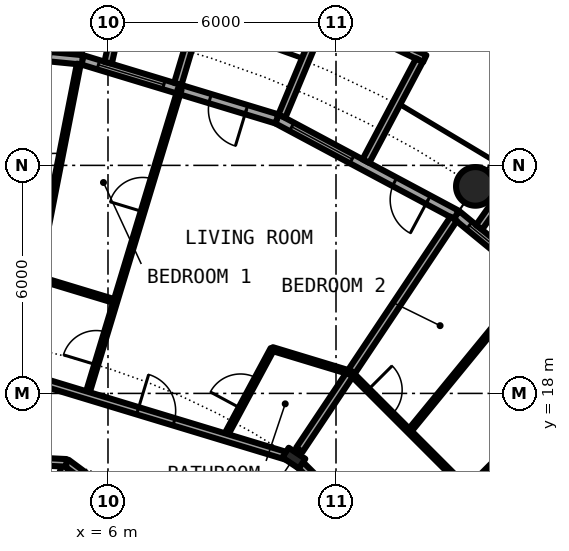
"""IFC4 building model, lengths in metres.
Left out: names, types, materials, properties, quantities, classifications, styles, units other than length and angle.
Written with IfcOpenShell. Run it as: python <this file> out.ifc"""

import sys

from ifc_helpers import new_model, si_unit, direction, frame, frame_2d, origin, origin_2d, place, context, subcontext, project, spatial, rectangle, circle, hollow_circle, i_section, extrude, element, fill, save


model = new_model("IFC4")
c1 = context("Model", 3, precision=1e-05, world=origin(), true_north=direction((0.0, 1.0)))
c2 = subcontext(c1, "Body", "Model", "MODEL_VIEW")
j1 = project(units=[si_unit("LENGTHUNIT", "METRE"), si_unit("PLANEANGLEUNIT", "RADIAN")], contexts=[c1])
p1 = place(None, origin())
s1 = spatial("IfcSite", under=j1, at=p1, CompositionType="ELEMENT")
p2 = place(p1, origin())
s2 = spatial("IfcBuilding", under=s1, at=p2, CompositionType="ELEMENT")
p3 = place(p2, frame((0.0, 0.0, 88.0)))
s3 = spatial("IfcBuildingStorey", under=s2, at=p3, CompositionType="ELEMENT", Elevation=88.0)
p4 = place(p3, frame((15.667, 23.448, 0.0), z_axis=(0.0, 0.0, 1.0), x_axis=(1.0, 0.0, 0.0)))
e1 = element("IfcColumn", 1, at=p4, inside=s3, PredefinedType="COLUMN", context=c2, shape_type="SweptSolid", body=[
    extrude(hollow_circle(Radius=0.508, WallThickness=0.04, at=origin_2d()), origin(), (0.0, 0.0, 1.0), 3.05),
])
p5 = place(p3, frame((10.889, 16.297, 0.0), z_axis=(0.0, 0.0, 1.0), x_axis=(0.55557023302, 0.831469612303, 0.0)))
e2 = element("IfcColumn", 2, at=p5, inside=s3, PredefinedType="COLUMN", context=c2, shape_type="SweptSolid", body=[
    extrude(i_section(OverallWidth=0.306, OverallDepth=0.524, WebThickness=0.021, FlangeThickness=0.04, FilletRadius=0.027, at=origin_2d()), origin(), (0.0, 0.0, 1.0), 3.05),
])
p6 = place(p3, frame((19.304, 19.304, 0.0), z_axis=(0.0, 0.0, 1.0), x_axis=(-0.773019449054, 0.634382322723, 0.0)))
e3 = element("IfcWall", 3, at=p6, inside=s3, PredefinedType="SOLIDWALL", context=c2, shape_type="SweptSolid", body=[
    extrude(rectangle(XDim=5.352, YDim=0.25, at=frame_2d((2.676, 0.0))), origin(), (0.0, 0.0, 1.0), 2.7),
])
p7 = place(p6, frame((0.841, 0.0, 0.0)))
e4 = element("IfcOpeningElement", 4, at=p7, cuts=e3, PredefinedType="OPENING", context=c2, shape_type="SweptSolid", body=[
    extrude(rectangle(XDim=1.0, YDim=2.2, at=frame_2d((0.5, 1.1))), frame((0.0, 0.135, 0.0), z_axis=(0.0, -1.0, 0.0), x_axis=(1.0, 0.0, 0.0)), (0.0, 0.0, 1.0), 0.27),
])
p8 = place(p6, frame((3.111, 0.0, 0.3)))
e5 = element("IfcOpeningElement", 5, at=p8, cuts=e3, PredefinedType="OPENING", context=c2, shape_type="SweptSolid", body=[
    extrude(rectangle(XDim=1.8, YDim=2.1, at=frame_2d((0.9, 1.05))), frame((0.0, 0.135, 0.0), z_axis=(0.0, -1.0, 0.0), x_axis=(1.0, 0.0, 0.0)), (0.0, 0.0, 1.0), 0.27),
])
p9 = place(p3, frame((15.765, 22.37, -0.03), z_axis=(0.0, 0.0, 1.0), x_axis=(0.576274612209, 0.817256123454, 0.0)))
e6 = element("IfcWall", 6, at=p9, inside=s3, PredefinedType="SOLIDWALL", context=c2, shape_type="SweptSolid", body=[
    extrude(rectangle(XDim=2.933, YDim=0.2, at=frame_2d((1.466, 0.0))), origin(), (0.0, 0.0, 1.0), 2.73),
])
p10 = place(p3, frame((15.167, 22.699, 0.0), z_axis=(0.0, 0.0, 1.0), x_axis=(-0.881915646801, 0.471407246368, 0.0)))
e7 = element("IfcWall", 7, at=p10, inside=s3, PredefinedType="SOLIDWALL", context=c2, shape_type="SweptSolid", body=[
    extrude(rectangle(XDim=5.352, YDim=0.25, at=frame_2d((2.676, 0.0))), origin(), (0.0, 0.0, 1.0), 2.7),
])
p11 = place(p10, frame((0.841, 0.0, 0.0)))
e8 = element("IfcOpeningElement", 8, at=p11, cuts=e7, PredefinedType="OPENING", context=c2, shape_type="SweptSolid", body=[
    extrude(rectangle(XDim=1.0, YDim=2.2, at=frame_2d((0.5, 1.1))), frame((0.0, 0.135, 0.0), z_axis=(0.0, -1.0, 0.0), x_axis=(1.0, 0.0, 0.0)), (0.0, 0.0, 1.0), 0.27),
])
p12 = place(p10, frame((3.111, 0.0, 0.3)))
e9 = element("IfcOpeningElement", 9, at=p12, cuts=e7, PredefinedType="OPENING", context=c2, shape_type="SweptSolid", body=[
    extrude(rectangle(XDim=1.8, YDim=2.1, at=frame_2d((0.9, 1.05))), frame((0.0, 0.135, 0.0), z_axis=(0.0, -1.0, 0.0), x_axis=(1.0, 0.0, 0.0)), (0.0, 0.0, 1.0), 0.27),
])
p13 = place(p3, frame((14.335, 26.808, -0.03), z_axis=(0.0, 0.0, 1.0), x_axis=(-0.904000060331, 0.427532327342, 0.0)))
e10 = element("IfcWall", 10, at=p13, inside=s3, PredefinedType="SOLIDWALL", context=c2, shape_type="SweptSolid", body=[
    extrude(rectangle(XDim=2.993, YDim=0.2, at=frame_2d((1.497, 0.0))), origin(), (0.0, 0.0, 1.0), 2.73),
])
p14 = place(p13, frame((0.457, 0.0, 0.33)))
e11 = element("IfcOpeningElement", 11, at=p14, cuts=e10, PredefinedType="OPENING", context=c2, shape_type="SweptSolid", body=[
    extrude(circle(Radius=1.04, at=frame_2d((1.04, 1.04))), frame((0.0, 0.11, 0.0), z_axis=(0.0, -1.0, 0.0), x_axis=(1.0, 0.0, 0.0)), (0.0, 0.0, 1.0), 0.22),
])
p15 = place(p3, frame((12.787, 24.113, -0.03), z_axis=(0.0, 0.0, 1.0), x_axis=(0.468365282436, 0.883534924159, 0.0)))
e12 = element("IfcWall", 12, at=p15, inside=s3, PredefinedType="SOLIDWALL", context=c2, shape_type="SweptSolid", body=[
    extrude(rectangle(XDim=3.006, YDim=0.2, at=frame_2d((1.503, 0.0))), origin(), (0.0, 0.0, 1.0), 2.73),
])
p16 = place(p3, frame((10.575, 25.295, -0.03), z_axis=(0.0, 0.0, 1.0), x_axis=(0.385697364644, 0.922625353492, 0.0)))
e13 = element("IfcWall", 13, at=p16, inside=s3, PredefinedType="SOLIDWALL", context=c2, shape_type="SweptSolid", body=[
    extrude(rectangle(XDim=2.883, YDim=0.2, at=frame_2d((1.442, 0.0))), origin(), (0.0, 0.0, 1.0), 2.73),
])
p17 = place(p3, frame((10.447, 25.222, 0.0), z_axis=(0.0, 0.0, 1.0), x_axis=(-0.956965678721, 0.290201119486, 0.0)))
e14 = element("IfcWall", 14, at=p17, inside=s3, PredefinedType="SOLIDWALL", context=c2, shape_type="SweptSolid", body=[
    extrude(rectangle(XDim=5.351, YDim=0.25, at=frame_2d((2.676, 0.0))), origin(), (0.0, 0.0, 1.0), 2.7),
])
p18 = place(p17, frame((0.841, 0.0, 0.0)))
e15 = element("IfcOpeningElement", 15, at=p18, cuts=e14, PredefinedType="OPENING", context=c2, shape_type="SweptSolid", body=[
    extrude(rectangle(XDim=1.0, YDim=2.2, at=frame_2d((0.5, 1.1))), frame((0.0, 0.135, 0.0), z_axis=(0.0, -1.0, 0.0), x_axis=(1.0, 0.0, 0.0)), (0.0, 0.0, 1.0), 0.27),
])
p19 = place(p17, frame((3.111, 0.0, 0.3)))
e16 = element("IfcOpeningElement", 16, at=p19, cuts=e14, PredefinedType="OPENING", context=c2, shape_type="SweptSolid", body=[
    extrude(rectangle(XDim=1.8, YDim=2.1, at=frame_2d((0.9, 1.05))), frame((0.0, 0.135, 0.0), z_axis=(0.0, -1.0, 0.0), x_axis=(1.0, 0.0, 0.0)), (0.0, 0.0, 1.0), 0.27),
])
p20 = place(p3, frame((7.837, 26.144, -0.03), z_axis=(0.0, 0.0, 1.0), x_axis=(0.287064767992, 0.957911174889, 0.0)))
e17 = element("IfcWall", 17, at=p20, inside=s3, PredefinedType="SOLIDWALL", context=c2, shape_type="SweptSolid", body=[
    extrude(rectangle(XDim=3.006, YDim=0.2, at=frame_2d((1.503, 0.0))), origin(), (0.0, 0.0, 1.0), 2.73),
])
p21 = place(p3, frame((6.004, 26.7, -0.03), z_axis=(0.0, 0.0, 1.0), x_axis=(0.219609259383, 0.975587911566, 0.0)))
e18 = element("IfcWall", 18, at=p21, inside=s3, PredefinedType="SOLIDWALL", context=c2, shape_type="SweptSolid", body=[
    extrude(rectangle(XDim=2.933, YDim=0.2, at=frame_2d((1.466, 0.0))), origin(), (0.0, 0.0, 1.0), 2.73),
])
p22 = place(p3, frame((5.326, 26.775, 0.0), z_axis=(0.0, 0.0, 1.0), x_axis=(-0.995173996315, 0.098126026407, 0.0)))
e19 = element("IfcWall", 19, at=p22, inside=s3, PredefinedType="SOLIDWALL", context=c2, shape_type="SweptSolid", body=[
    extrude(rectangle(XDim=5.352, YDim=0.25, at=frame_2d((2.676, 0.0))), origin(), (0.0, 0.0, 1.0), 2.7),
])
p23 = place(p22, frame((0.841, 0.0, 0.0)))
e20 = element("IfcOpeningElement", 20, at=p23, cuts=e19, PredefinedType="OPENING", context=c2, shape_type="SweptSolid", body=[
    extrude(rectangle(XDim=1.0, YDim=2.2, at=frame_2d((0.5, 1.1))), frame((0.0, 0.135, 0.0), z_axis=(0.0, -1.0, 0.0), x_axis=(1.0, 0.0, 0.0)), (0.0, 0.0, 1.0), 0.27),
])
p24 = place(p22, frame((3.111, 0.0, 0.3)))
e21 = element("IfcOpeningElement", 21, at=p24, cuts=e19, PredefinedType="OPENING", context=c2, shape_type="SweptSolid", body=[
    extrude(rectangle(XDim=1.8, YDim=2.1, at=frame_2d((0.9, 1.05))), frame((0.0, 0.135, 0.0), z_axis=(0.0, -1.0, 0.0), x_axis=(1.0, 0.0, 0.0)), (0.0, 0.0, 1.0), 0.27),
])
p25 = place(p3, frame((2.243, 7.387, 0.0), z_axis=(0.0, 0.0, 1.0), x_axis=(0.290196345171, 0.956967126525, 0.0)))
e22 = element("IfcWall", 22, at=p25, inside=s3, PredefinedType="PARTITIONING", context=c2, shape_type="SweptSolid", body=[
    extrude(rectangle(XDim=9.18, YDim=0.2, at=frame_2d((4.59, 0.0))), origin(), (0.0, 0.0, 1.0), 2.7),
])
p26 = place(p3, frame((4.13, 21.047, 0.0), z_axis=(0.0, 0.0, 1.0), x_axis=(0.192433779325, 0.981309961518, 0.0)))
e23 = element("IfcWall", 23, at=p26, inside=s3, PredefinedType="PARTITIONING", context=c2, shape_type="SweptSolid", body=[
    extrude(rectangle(XDim=5.727, YDim=0.1, at=frame_2d((2.863, 0.0))), origin(), (0.0, 0.0, 1.0), 2.7),
])
p27 = place(p26, frame((2.414, 0.0, 0.0)))
e24 = element("IfcOpeningElement", 24, at=p27, cuts=e23, PredefinedType="OPENING", context=c2, shape_type="SweptSolid", body=[
    extrude(rectangle(XDim=0.9, YDim=2.3, at=frame_2d((0.45, 1.15))), frame((0.0, 0.06, 0.0), z_axis=(0.0, -1.0, 0.0), x_axis=(1.0, 0.0, 0.0)), (0.0, 0.0, 1.0), 0.12),
])
p28 = place(p3, frame((5.445, 17.948, 0.0), z_axis=(0.0, 0.0, 1.0), x_axis=(0.290158700753, 0.956978541231, 0.0)))
e25 = element("IfcWall", 25, at=p28, inside=s3, PredefinedType="PARTITIONING", context=c2, shape_type="SweptSolid", body=[
    extrude(rectangle(XDim=8.419, YDim=0.1, at=frame_2d((4.209, 0.0))), origin(), (0.0, 0.0, 1.0), 2.7),
])
p29 = place(p28, frame((0.842, 0.0, 0.0)))
e26 = element("IfcOpeningElement", 26, at=p29, cuts=e25, PredefinedType="OPENING", context=c2, shape_type="SweptSolid", body=[
    extrude(rectangle(XDim=0.9, YDim=2.3, at=frame_2d((0.45, 1.15))), frame((0.0, 0.06, 0.0), z_axis=(0.0, -1.0, 0.0), x_axis=(1.0, 0.0, 0.0)), (0.0, 0.0, 1.0), 0.12),
])
p30 = place(p28, frame((5.052, 0.0, 0.0)))
e27 = element("IfcOpeningElement", 27, at=p30, cuts=e25, PredefinedType="OPENING", context=c2, shape_type="SweptSolid", body=[
    extrude(rectangle(XDim=0.9, YDim=2.3, at=frame_2d((0.45, 1.15))), frame((0.0, 0.06, 0.0), z_axis=(0.0, -1.0, 0.0), x_axis=(1.0, 0.0, 0.0)), (0.0, 0.0, 1.0), 0.12),
])
p31 = place(p3, frame((9.074, 16.847, 0.0), z_axis=(0.0, 0.0, 1.0), x_axis=(0.474160570331, 0.880438387136, 0.0)))
e28 = element("IfcWall", 28, at=p31, inside=s3, PredefinedType="PARTITIONING", context=c2, shape_type="SweptSolid", body=[
    extrude(rectangle(XDim=2.636, YDim=0.1, at=frame_2d((1.318, 0.0))), origin(), (0.0, 0.0, 1.0), 2.7),
])
p32 = place(p31, frame((0.868, 0.0, 0.0)))
e29 = element("IfcOpeningElement", 29, at=p32, cuts=e28, PredefinedType="OPENING", context=c2, shape_type="SweptSolid", body=[
    extrude(rectangle(XDim=0.9, YDim=2.3, at=frame_2d((0.45, 1.15))), frame((0.0, 0.06, 0.0), z_axis=(0.0, -1.0, 0.0), x_axis=(1.0, 0.0, 0.0)), (0.0, 0.0, 1.0), 0.12),
])
p33 = place(p3, frame((11.035, 16.515, 0.0), z_axis=(0.0, 0.0, 1.0), x_axis=(0.555516661303, 0.831505405283, 0.0)))
e30 = element("IfcWall", 30, at=p33, inside=s3, PredefinedType="PARTITIONING", context=c2, shape_type="SweptSolid", body=[
    extrude(rectangle(XDim=7.312, YDim=0.2, at=frame_2d((3.656, 0.0))), origin(), (0.0, 0.0, 1.0), 2.7),
])
p34 = place(p3, frame((13.927, 17.004, 0.0), z_axis=(0.0, 0.0, 1.0), x_axis=(0.633774976367, 0.773517471898, 0.0)))
e31 = element("IfcWall", 31, at=p34, inside=s3, PredefinedType="PARTITIONING", context=c2, shape_type="SweptSolid", body=[
    extrude(rectangle(XDim=5.196, YDim=0.1, at=frame_2d((2.598, 0.0))), origin(), (0.0, 0.0, 1.0), 2.7),
])
p35 = place(p3, frame((15.465, 15.465, 0.0), z_axis=(0.0, 0.0, 1.0), x_axis=(0.707106781187, 0.707106781187, 0.0)))
e32 = element("IfcWall", 32, at=p35, inside=s3, PredefinedType="PARTITIONING", context=c2, shape_type="SweptSolid", body=[
    extrude(rectangle(XDim=5.305, YDim=0.1, at=frame_2d((2.652, 0.0))), origin(), (0.0, 0.0, 1.0), 2.7),
])
p36 = place(p35, frame((2.202, 0.0, 0.0)))
e33 = element("IfcOpeningElement", 33, at=p36, cuts=e32, PredefinedType="OPENING", context=c2, shape_type="SweptSolid", body=[
    extrude(rectangle(XDim=0.9, YDim=2.3, at=frame_2d((0.45, 1.15))), frame((0.0, 0.06, 0.0), z_axis=(0.0, -1.0, 0.0), x_axis=(1.0, 0.0, 0.0)), (0.0, 0.0, 1.0), 0.12),
])
p37 = place(p3, frame((4.906, 16.172, 0.0), z_axis=(0.0, 0.0, 1.0), x_axis=(0.803191461888, -0.595720971219, 0.0)))
e34 = element("IfcWall", 34, at=p37, inside=s3, PredefinedType="PARTITIONING", context=c2, shape_type="SweptSolid", body=[
    extrude(rectangle(XDim=9.76, YDim=0.2, at=frame_2d((4.88, 0.0))), origin(), (0.0, 0.0, 1.0), 2.7),
])
p38 = place(p37, frame((4.38, 0.0, 0.0)))
e35 = element("IfcOpeningElement", 35, at=p38, cuts=e34, PredefinedType="OPENING", context=c2, shape_type="SweptSolid", body=[
    extrude(rectangle(XDim=1.0, YDim=2.3, at=frame_2d((0.5, 1.15))), frame((0.0, 0.11, 0.0), z_axis=(0.0, -1.0, 0.0), x_axis=(1.0, 0.0, 0.0)), (0.0, 0.0, 1.0), 0.22),
])
p39 = place(p3, frame((-3.298, 16.574, 0.0), z_axis=(0.0, 0.0, 1.0), x_axis=(0.998802523271, -0.048923608895, 0.0)))
e36 = element("IfcWall", 36, at=p39, inside=s3, PredefinedType="PARTITIONING", context=c2, shape_type="SweptSolid", body=[
    extrude(rectangle(XDim=8.214, YDim=0.2, at=frame_2d((4.107, 0.0))), origin(), (0.0, 0.0, 1.0), 2.7),
])
p40 = place(p39, frame((3.6, 0.0, 0.0)))
e37 = element("IfcOpeningElement", 37, at=p40, cuts=e36, PredefinedType="OPENING", context=c2, shape_type="SweptSolid", body=[
    extrude(rectangle(XDim=1.0, YDim=2.3, at=frame_2d((0.5, 1.15))), frame((0.0, 0.11, 0.0), z_axis=(0.0, -1.0, 0.0), x_axis=(1.0, 0.0, 0.0)), (0.0, 0.0, 1.0), 0.22),
])
p41 = place(p3, frame((-0.007, 19.599, 0.0), z_axis=(0.0, 0.0, 1.0), x_axis=(0.95700958731, -0.290056287291, 0.0)))
e38 = element("IfcWall", 38, at=p41, inside=s3, PredefinedType="PARTITIONING", context=c2, shape_type="SweptSolid", body=[
    extrude(rectangle(XDim=11.226, YDim=0.2, at=frame_2d((5.613, 0.0))), origin(), (0.0, 0.0, 1.0), 2.38),
])
p42 = place(p41, frame((7.093, 0.0, 0.0)))
e39 = element("IfcOpeningElement", 39, at=p42, cuts=e38, PredefinedType="OPENING", context=c2, shape_type="SweptSolid", body=[
    extrude(rectangle(XDim=1.0, YDim=2.3, at=frame_2d((0.5, 1.15))), frame((0.0, 0.11, 0.0), z_axis=(0.0, -1.0, 0.0), x_axis=(1.0, 0.0, 0.0)), (0.0, 0.0, 1.0), 0.22),
])
p43 = place(p3, frame((11.0, 16.186, 0.0), z_axis=(0.0, 0.0, 1.0), x_axis=(0.707106781187, -0.707106781187, 0.0)))
e40 = element("IfcWall", 40, at=p43, inside=s3, PredefinedType="PARTITIONING", context=c2, shape_type="SweptSolid", body=[
    extrude(rectangle(XDim=7.334, YDim=0.2, at=frame_2d((3.667, 0.0))), origin(), (0.0, 0.0, 1.0), 2.38),
])
p44 = place(p43, frame((2.211, 0.0, 0.0)))
e41 = element("IfcOpeningElement", 41, at=p44, cuts=e40, PredefinedType="OPENING", context=c2, shape_type="SweptSolid", body=[
    extrude(rectangle(XDim=1.0, YDim=2.3, at=frame_2d((0.5, 1.15))), frame((0.0, 0.11, 0.0), z_axis=(0.0, -1.0, 0.0), x_axis=(1.0, 0.0, 0.0)), (0.0, 0.0, 1.0), 0.22),
])
p45 = place(p3, frame((-0.004, 22.299, 0.0), z_axis=(0.0, 0.0, 1.0), x_axis=(0.95699555343, -0.290102586537, 0.0)))
e42 = element("IfcWall", 42, at=p45, inside=s3, PredefinedType="PARTITIONING", context=c2, shape_type="SweptSolid", body=[
    extrude(rectangle(XDim=6.478, YDim=0.1, at=frame_2d((3.239, 0.0))), origin(), (0.0, 0.0, 1.0), 2.7),
])
p46 = place(p3, frame((10.324, 19.168, 0.0), z_axis=(0.0, 0.0, 1.0), x_axis=(0.956993947591, -0.290107883852, 0.0)))
e43 = element("IfcWall", 43, at=p46, inside=s3, PredefinedType="PARTITIONING", context=c2, shape_type="SweptSolid", body=[
    extrude(rectangle(XDim=2.158, YDim=0.1, at=frame_2d((1.079, 0.0))), origin(), (0.0, 0.0, 1.0), 2.7),
])
p47 = place(p3, frame((12.389, 18.542, 0.0), z_axis=(0.0, 0.0, 1.0), x_axis=(0.707022606819, -0.707190945535, 0.0)))
e44 = element("IfcWall", 44, at=p47, inside=s3, PredefinedType="PARTITIONING", context=c2, shape_type="SweptSolid", body=[
    extrude(rectangle(XDim=4.351, YDim=0.1, at=frame_2d((2.175, 0.0))), origin(), (0.0, 0.0, 1.0), 2.7),
])
p48 = place(p47, frame((0.639, 0.0, 0.0)))
e45 = element("IfcOpeningElement", 45, at=p48, cuts=e44, PredefinedType="OPENING", context=c2, shape_type="SweptSolid", body=[
    extrude(rectangle(XDim=0.9, YDim=2.3, at=frame_2d((0.45, 1.15))), frame((0.0, 0.06, 0.0), z_axis=(0.0, -1.0, 0.0), x_axis=(1.0, 0.0, 0.0)), (0.0, 0.0, 1.0), 0.12),
])
p49 = place(p8, origin())
e46 = element("IfcWindow", 46, at=p49, inside=s3, PartitioningType="SINGLE_PANEL", PredefinedType="WINDOW", context=c2, shape_type="SweptSolid", body=[
    extrude(rectangle(XDim=1.8, YDim=2.1, at=frame_2d((0.9, 1.05))), frame((0.0, 0.03, 0.0), z_axis=(0.0, -1.0, 0.0), x_axis=(1.0, 0.0, 0.0)), (0.0, 0.0, 1.0), 0.06),
])
fill(e5, e46)
p50 = place(p11, origin())
e47 = element("IfcDoor", 47, at=p50, inside=s3, OperationType="SINGLE_SWING_LEFT", PredefinedType="DOOR", context=c2, shape_type="SweptSolid", body=[
    extrude(rectangle(XDim=1.0, YDim=2.2, at=frame_2d((0.5, 1.1))), frame((0.0, 0.025, 0.0), z_axis=(0.0, -1.0, 0.0), x_axis=(1.0, 0.0, 0.0)), (0.0, 0.0, 1.0), 0.05),
])
fill(e8, e47)
p51 = place(p12, origin())
e48 = element("IfcWindow", 48, at=p51, inside=s3, PartitioningType="SINGLE_PANEL", PredefinedType="WINDOW", context=c2, shape_type="SweptSolid", body=[
    extrude(rectangle(XDim=1.8, YDim=2.1, at=frame_2d((0.9, 1.05))), frame((0.0, 0.03, 0.0), z_axis=(0.0, -1.0, 0.0), x_axis=(1.0, 0.0, 0.0)), (0.0, 0.0, 1.0), 0.06),
])
fill(e9, e48)
p52 = place(p14, origin())
e49 = element("IfcWindow", 49, at=p52, inside=s3, PartitioningType="SINGLE_PANEL", PredefinedType="WINDOW", context=c2, shape_type="SweptSolid", body=[
    extrude(circle(Radius=1.04, at=frame_2d((1.04, 1.04))), frame((0.0, 0.03, 0.0), z_axis=(0.0, -1.0, 0.0), x_axis=(1.0, 0.0, 0.0)), (0.0, 0.0, 1.0), 0.06),
])
fill(e11, e49)
p53 = place(p18, origin())
e50 = element("IfcDoor", 50, at=p53, inside=s3, OperationType="SINGLE_SWING_LEFT", PredefinedType="DOOR", context=c2, shape_type="SweptSolid", body=[
    extrude(rectangle(XDim=1.0, YDim=2.2, at=frame_2d((0.5, 1.1))), frame((0.0, 0.025, 0.0), z_axis=(0.0, -1.0, 0.0), x_axis=(1.0, 0.0, 0.0)), (0.0, 0.0, 1.0), 0.05),
])
fill(e15, e50)
p54 = place(p19, origin())
e51 = element("IfcWindow", 51, at=p54, inside=s3, PartitioningType="SINGLE_PANEL", PredefinedType="WINDOW", context=c2, shape_type="SweptSolid", body=[
    extrude(rectangle(XDim=1.8, YDim=2.1, at=frame_2d((0.9, 1.05))), frame((0.0, 0.03, 0.0), z_axis=(0.0, -1.0, 0.0), x_axis=(1.0, 0.0, 0.0)), (0.0, 0.0, 1.0), 0.06),
])
fill(e16, e51)
p55 = place(p48, origin())
e52 = element("IfcDoor", 52, at=p55, inside=s3, OperationType="SINGLE_SWING_LEFT", PredefinedType="DOOR", context=c2, shape_type="SweptSolid", body=[
    extrude(rectangle(XDim=0.9, YDim=2.3, at=frame_2d((0.45, 1.15))), frame((0.0, 0.025, 0.0), z_axis=(0.0, -1.0, 0.0), x_axis=(1.0, 0.0, 0.0)), (0.0, 0.0, 1.0), 0.05),
])
fill(e45, e52)
p56 = place(p42, origin())
e53 = element("IfcDoor", 53, at=p56, inside=s3, OperationType="SINGLE_SWING_RIGHT", PredefinedType="DOOR", context=c2, shape_type="SweptSolid", body=[
    extrude(rectangle(XDim=1.0, YDim=2.3, at=frame_2d((0.5, 1.15))), frame((0.0, 0.025, 0.0), z_axis=(0.0, -1.0, 0.0), x_axis=(1.0, 0.0, 0.0)), (0.0, 0.0, 1.0), 0.05),
])
fill(e39, e53)
p57 = place(p32, origin())
e54 = element("IfcDoor", 54, at=p57, inside=s3, OperationType="SINGLE_SWING_RIGHT", PredefinedType="DOOR", context=c2, shape_type="SweptSolid", body=[
    extrude(rectangle(XDim=0.9, YDim=2.3, at=frame_2d((0.45, 1.15))), frame((0.0, 0.025, 0.0), z_axis=(0.0, -1.0, 0.0), x_axis=(1.0, 0.0, 0.0)), (0.0, 0.0, 1.0), 0.05),
])
fill(e29, e54)
p58 = place(p29, origin())
e55 = element("IfcDoor", 55, at=p58, inside=s3, OperationType="SINGLE_SWING_LEFT", PredefinedType="DOOR", context=c2, shape_type="SweptSolid", body=[
    extrude(rectangle(XDim=0.9, YDim=2.3, at=frame_2d((0.45, 1.15))), frame((0.0, 0.025, 0.0), z_axis=(0.0, -1.0, 0.0), x_axis=(1.0, 0.0, 0.0)), (0.0, 0.0, 1.0), 0.05),
])
fill(e26, e55)
p59 = place(p30, origin())
e56 = element("IfcDoor", 56, at=p59, inside=s3, OperationType="SINGLE_SWING_RIGHT", PredefinedType="DOOR", context=c2, shape_type="SweptSolid", body=[
    extrude(rectangle(XDim=0.9, YDim=2.3, at=frame_2d((0.45, 1.15))), frame((0.0, 0.025, 0.0), z_axis=(0.0, -1.0, 0.0), x_axis=(1.0, 0.0, 0.0)), (0.0, 0.0, 1.0), 0.05),
])
fill(e27, e56)
p60 = place(p27, origin())
e57 = element("IfcDoor", 57, at=p60, inside=s3, OperationType="SINGLE_SWING_RIGHT", PredefinedType="DOOR", context=c2, shape_type="SweptSolid", body=[
    extrude(rectangle(XDim=0.9, YDim=2.3, at=frame_2d((0.45, 1.15))), frame((0.0, 0.025, 0.0), z_axis=(0.0, -1.0, 0.0), x_axis=(1.0, 0.0, 0.0)), (0.0, 0.0, 1.0), 0.05),
])
fill(e24, e57)
save(model, sys.argv[1])
